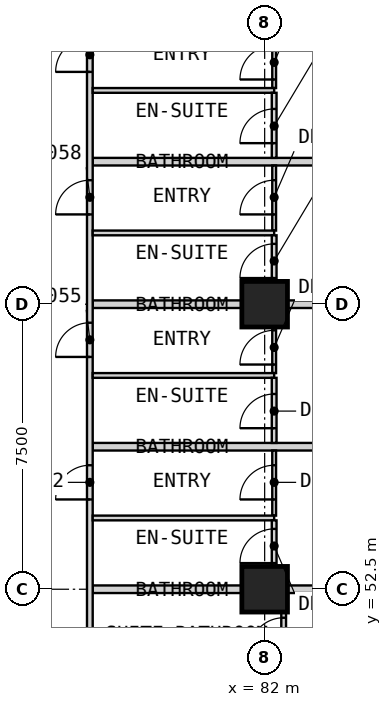
"""IFC4 building model, lengths in metres.
Left out: names, types, materials, properties, quantities, classifications, styles, units other than length and angle.
Written with IfcOpenShell. Run it as: python <this file> out.ifc"""

import sys

from ifc_helpers import new_model, si_unit, direction, frame, frame_2d, origin, origin_2d, place, context, subcontext, project, spatial, rectangle, extrude, element, fill, save


model = new_model("IFC4")
c1 = context("Model", 3, precision=1e-05, world=origin(), true_north=direction((0.0, 1.0)))
c2 = subcontext(c1, "Body", "Model", "MODEL_VIEW")
j1 = project(units=[si_unit("LENGTHUNIT", "METRE"), si_unit("PLANEANGLEUNIT", "RADIAN")], contexts=[c1])
p1 = place(None, origin())
s1 = spatial("IfcSite", under=j1, at=p1, CompositionType="ELEMENT")
p2 = place(p1, origin())
s2 = spatial("IfcBuilding", under=s1, at=p2, CompositionType="ELEMENT")
p3 = place(p2, frame((0.0, 0.0, 34.0)))
s3 = spatial("IfcBuildingStorey", under=s2, at=p3, CompositionType="ELEMENT", Elevation=34.0)
for number, where, z_axis, x_axis in (
    (1, (82.0, 52.5, 0.0), (0.0, 0.0, 1.0), (1.0, 0.0, 0.0)),
    (2, (82.0, 60.0, 0.0), (0.0, 0.0, 1.0), (1.0, 0.0, 0.0)),
):
    element("IfcColumn", number, at=place(p3, frame(where, z_axis=z_axis, x_axis=x_axis)), inside=s3, PredefinedType="COLUMN", context=c2, shape_type="SweptSolid", body=[
        extrude(rectangle(XDim=1.2, YDim=1.2, at=origin_2d()), origin(), (0.0, 0.0, 1.0), 3.6),
    ])
p4 = place(p3, frame((77.475, 52.5, 0.0), z_axis=(0.0, 0.0, 1.0), x_axis=(1.0, 0.0, 0.0)))
e3 = element("IfcWall", 3, at=p4, inside=s3, PredefinedType="PARTITIONING", context=c2, shape_type="SweptSolid", body=[
    extrude(rectangle(XDim=12.525, YDim=0.2, at=frame_2d((6.262, 0.0))), origin(), (0.0, 0.0, 1.0), 3.35),
])
p5 = place(p3, frame((77.475, 56.25, 0.0), z_axis=(0.0, 0.0, 1.0), x_axis=(1.0, 0.0, 0.0)))
e4 = element("IfcWall", 4, at=p5, inside=s3, PredefinedType="PARTITIONING", context=c2, shape_type="SweptSolid", body=[
    extrude(rectangle(XDim=11.715, YDim=0.2, at=frame_2d((5.857, 0.0))), origin(), (0.0, 0.0, 1.0), 3.35),
])
p6 = place(p3, frame((77.475, 60.0, 0.0), z_axis=(0.0, 0.0, 1.0), x_axis=(1.0, 0.0, 0.0)))
e5 = element("IfcWall", 5, at=p6, inside=s3, PredefinedType="PARTITIONING", context=c2, shape_type="SweptSolid", body=[
    extrude(rectangle(XDim=12.525, YDim=0.2, at=frame_2d((6.262, 0.0))), origin(), (0.0, 0.0, 1.0), 3.35),
])
p7 = place(p3, frame((77.475, 63.75, 0.0), z_axis=(0.0, 0.0, 1.0), x_axis=(1.0, 0.0, 0.0)))
e6 = element("IfcWall", 6, at=p7, inside=s3, PredefinedType="PARTITIONING", context=c2, shape_type="SweptSolid", body=[
    extrude(rectangle(XDim=11.715, YDim=0.2, at=frame_2d((5.857, 0.0))), origin(), (0.0, 0.0, 1.0), 3.35),
])
p8 = place(p3, frame((77.4, 50.175, 0.0), z_axis=(0.0, 0.0, 1.0), x_axis=(0.0, 1.0, 0.0)))
e7 = element("IfcWall", 7, at=p8, inside=s3, PredefinedType="PARTITIONING", context=c2, shape_type="SweptSolid", body=[
    extrude(rectangle(XDim=42.15, YDim=0.15, at=frame_2d((21.075, 0.0))), origin(), (0.0, 0.0, 1.0), 3.35),
])
p9 = place(p8, frame((4.688, 0.0, 0.0)))
e8 = element("IfcOpeningElement", 8, at=p9, cuts=e7, PredefinedType="OPENING", context=c2, shape_type="SweptSolid", body=[
    extrude(rectangle(XDim=0.9, YDim=2.1, at=frame_2d((0.45, 1.05))), frame((0.0, 0.085, 0.0), z_axis=(0.0, -1.0, 0.0), x_axis=(1.0, 0.0, 0.0)), (0.0, 0.0, 1.0), 0.17),
])
p10 = place(p8, frame((8.438, 0.0, 0.0)))
e9 = element("IfcOpeningElement", 9, at=p10, cuts=e7, PredefinedType="OPENING", context=c2, shape_type="SweptSolid", body=[
    extrude(rectangle(XDim=0.9, YDim=2.1, at=frame_2d((0.45, 1.05))), frame((0.0, 0.085, 0.0), z_axis=(0.0, -1.0, 0.0), x_axis=(1.0, 0.0, 0.0)), (0.0, 0.0, 1.0), 0.17),
])
p11 = place(p8, frame((12.188, 0.0, 0.0)))
e10 = element("IfcOpeningElement", 10, at=p11, cuts=e7, PredefinedType="OPENING", context=c2, shape_type="SweptSolid", body=[
    extrude(rectangle(XDim=0.9, YDim=2.1, at=frame_2d((0.45, 1.05))), frame((0.0, 0.085, 0.0), z_axis=(0.0, -1.0, 0.0), x_axis=(1.0, 0.0, 0.0)), (0.0, 0.0, 1.0), 0.17),
])
p12 = place(p8, frame((15.938, 0.0, 0.0)))
e11 = element("IfcOpeningElement", 11, at=p12, cuts=e7, PredefinedType="OPENING", context=c2, shape_type="SweptSolid", body=[
    extrude(rectangle(XDim=0.9, YDim=2.1, at=frame_2d((0.45, 1.05))), frame((0.0, 0.085, 0.0), z_axis=(0.0, -1.0, 0.0), x_axis=(1.0, 0.0, 0.0)), (0.0, 0.0, 1.0), 0.17),
])
p13 = place(p8, frame((19.688, 0.0, 0.0)))
e12 = element("IfcOpeningElement", 12, at=p13, cuts=e7, PredefinedType="OPENING", context=c2, shape_type="SweptSolid", body=[
    extrude(rectangle(XDim=0.9, YDim=2.1, at=frame_2d((0.45, 1.05))), frame((0.0, 0.085, 0.0), z_axis=(0.0, -1.0, 0.0), x_axis=(1.0, 0.0, 0.0)), (0.0, 0.0, 1.0), 0.17),
])
p14 = place(p8, frame((23.438, 0.0, 0.0)))
e13 = element("IfcOpeningElement", 13, at=p14, cuts=e7, PredefinedType="OPENING", context=c2, shape_type="SweptSolid", body=[
    extrude(rectangle(XDim=0.9, YDim=2.1, at=frame_2d((0.45, 1.05))), frame((0.0, 0.085, 0.0), z_axis=(0.0, -1.0, 0.0), x_axis=(1.0, 0.0, 0.0)), (0.0, 0.0, 1.0), 0.17),
])
p15 = place(p8, frame((27.188, 0.0, 0.0)))
e14 = element("IfcOpeningElement", 14, at=p15, cuts=e7, PredefinedType="OPENING", context=c2, shape_type="SweptSolid", body=[
    extrude(rectangle(XDim=0.9, YDim=2.1, at=frame_2d((0.45, 1.05))), frame((0.0, 0.085, 0.0), z_axis=(0.0, -1.0, 0.0), x_axis=(1.0, 0.0, 0.0)), (0.0, 0.0, 1.0), 0.17),
])
p16 = place(p8, frame((30.938, 0.0, 0.0)))
e15 = element("IfcOpeningElement", 15, at=p16, cuts=e7, PredefinedType="OPENING", context=c2, shape_type="SweptSolid", body=[
    extrude(rectangle(XDim=0.9, YDim=2.1, at=frame_2d((0.45, 1.05))), frame((0.0, 0.085, 0.0), z_axis=(0.0, -1.0, 0.0), x_axis=(1.0, 0.0, 0.0)), (0.0, 0.0, 1.0), 0.17),
])
p17 = place(p8, frame((34.688, 0.0, 0.0)))
e16 = element("IfcOpeningElement", 16, at=p17, cuts=e7, PredefinedType="OPENING", context=c2, shape_type="SweptSolid", body=[
    extrude(rectangle(XDim=0.9, YDim=2.1, at=frame_2d((0.45, 1.05))), frame((0.0, 0.085, 0.0), z_axis=(0.0, -1.0, 0.0), x_axis=(1.0, 0.0, 0.0)), (0.0, 0.0, 1.0), 0.17),
])
p18 = place(p8, frame((38.438, 0.0, 0.0)))
e17 = element("IfcOpeningElement", 17, at=p18, cuts=e7, PredefinedType="OPENING", context=c2, shape_type="SweptSolid", body=[
    extrude(rectangle(XDim=0.9, YDim=2.1, at=frame_2d((0.45, 1.05))), frame((0.0, 0.085, 0.0), z_axis=(0.0, -1.0, 0.0), x_axis=(1.0, 0.0, 0.0)), (0.0, 0.0, 1.0), 0.17),
])
p19 = place(p3, frame((82.25, 54.438, 0.0), z_axis=(0.0, 0.0, 1.0), x_axis=(0.0, 1.0, 0.0)))
e18 = element("IfcWall", 18, at=p19, inside=s3, PredefinedType="PARTITIONING", context=c2, shape_type="SweptSolid", body=[
    extrude(rectangle(XDim=1.712, YDim=0.1, at=frame_2d((0.856, 0.0))), origin(), (0.0, 0.0, 1.0), 3.35),
])
p20 = place(p19, frame((0.425, 0.0, 0.0)))
e19 = element("IfcOpeningElement", 19, at=p20, cuts=e18, PredefinedType="OPENING", context=c2, shape_type="SweptSolid", body=[
    extrude(rectangle(XDim=0.9, YDim=2.1, at=frame_2d((0.45, 1.05))), frame((0.0, 0.06, 0.0), z_axis=(0.0, -1.0, 0.0), x_axis=(1.0, 0.0, 0.0)), (0.0, 0.0, 1.0), 0.12),
])
p21 = place(p3, frame((82.25, 58.188, 0.0), z_axis=(0.0, 0.0, 1.0), x_axis=(0.0, 1.0, 0.0)))
e20 = element("IfcWall", 20, at=p21, inside=s3, PredefinedType="PARTITIONING", context=c2, shape_type="SweptSolid", body=[
    extrude(rectangle(XDim=1.712, YDim=0.1, at=frame_2d((0.856, 0.0))), origin(), (0.0, 0.0, 1.0), 3.35),
])
p22 = place(p21, frame((0.225, 0.0, 0.0)))
e21 = element("IfcOpeningElement", 21, at=p22, cuts=e20, PredefinedType="OPENING", context=c2, shape_type="SweptSolid", body=[
    extrude(rectangle(XDim=0.9, YDim=2.1, at=frame_2d((0.45, 1.05))), frame((0.0, 0.06, 0.0), z_axis=(0.0, -1.0, 0.0), x_axis=(1.0, 0.0, 0.0)), (0.0, 0.0, 1.0), 0.12),
])
p23 = place(p3, frame((82.25, 61.938, 0.0), z_axis=(0.0, 0.0, 1.0), x_axis=(0.0, 1.0, 0.0)))
e22 = element("IfcWall", 22, at=p23, inside=s3, PredefinedType="PARTITIONING", context=c2, shape_type="SweptSolid", body=[
    extrude(rectangle(XDim=1.712, YDim=0.1, at=frame_2d((0.856, 0.0))), origin(), (0.0, 0.0, 1.0), 3.35),
])
p24 = place(p23, frame((0.425, 0.0, 0.0)))
e23 = element("IfcOpeningElement", 23, at=p24, cuts=e22, PredefinedType="OPENING", context=c2, shape_type="SweptSolid", body=[
    extrude(rectangle(XDim=0.9, YDim=2.1, at=frame_2d((0.45, 1.05))), frame((0.0, 0.06, 0.0), z_axis=(0.0, -1.0, 0.0), x_axis=(1.0, 0.0, 0.0)), (0.0, 0.0, 1.0), 0.12),
])
p25 = place(p3, frame((82.25, 65.688, 0.0), z_axis=(0.0, 0.0, 1.0), x_axis=(0.0, 1.0, 0.0)))
e24 = element("IfcWall", 24, at=p25, inside=s3, PredefinedType="PARTITIONING", context=c2, shape_type="SweptSolid", body=[
    extrude(rectangle(XDim=1.712, YDim=0.1, at=frame_2d((0.856, 0.0))), origin(), (0.0, 0.0, 1.0), 3.35),
])
p26 = place(p25, frame((0.225, 0.0, 0.0)))
e25 = element("IfcOpeningElement", 25, at=p26, cuts=e24, PredefinedType="OPENING", context=c2, shape_type="SweptSolid", body=[
    extrude(rectangle(XDim=0.9, YDim=2.1, at=frame_2d((0.45, 1.05))), frame((0.0, 0.06, 0.0), z_axis=(0.0, -1.0, 0.0), x_axis=(1.0, 0.0, 0.0)), (0.0, 0.0, 1.0), 0.12),
])
for number, where, z_axis, x_axis in (
    (26, (77.475, 54.375, 0.0), (0.0, 0.0, 1.0), (1.0, 0.0, 0.0)),
    (27, (77.475, 58.125, 0.0), (0.0, 0.0, 1.0), (1.0, 0.0, 0.0)),
    (28, (77.475, 61.875, 0.0), (0.0, 0.0, 1.0), (1.0, 0.0, 0.0)),
    (29, (77.475, 65.625, 0.0), (0.0, 0.0, 1.0), (1.0, 0.0, 0.0)),
):
    element("IfcWall", number, at=place(p3, frame(where, z_axis=z_axis, x_axis=x_axis)), inside=s3, PredefinedType="PARTITIONING", context=c2, shape_type="SweptSolid", body=[
        extrude(rectangle(XDim=4.775, YDim=0.125, at=frame_2d((2.387, 0.0))), origin(), (0.0, 0.0, 1.0), 3.35),
    ])
p27 = place(p3, frame((82.25, 52.6, 0.0), z_axis=(0.0, 0.0, 1.0), x_axis=(0.0, 1.0, 0.0)))
e30 = element("IfcWall", 30, at=p27, inside=s3, PredefinedType="PARTITIONING", context=c2, shape_type="SweptSolid", body=[
    extrude(rectangle(XDim=1.712, YDim=0.125, at=frame_2d((0.856, 0.0))), origin(), (0.0, 0.0, 1.0), 3.35),
])
p28 = place(p27, frame((0.587, 0.0, 0.0)))
e31 = element("IfcOpeningElement", 31, at=p28, cuts=e30, PredefinedType="OPENING", context=c2, shape_type="SweptSolid", body=[
    extrude(rectangle(XDim=0.9, YDim=2.1, at=frame_2d((0.45, 1.05))), frame((0.0, 0.073, 0.0), z_axis=(0.0, -1.0, 0.0), x_axis=(1.0, 0.0, 0.0)), (0.0, 0.0, 1.0), 0.145),
])
p29 = place(p3, frame((82.25, 56.35, 0.0), z_axis=(0.0, 0.0, 1.0), x_axis=(0.0, 1.0, 0.0)))
e32 = element("IfcWall", 32, at=p29, inside=s3, PredefinedType="PARTITIONING", context=c2, shape_type="SweptSolid", body=[
    extrude(rectangle(XDim=1.712, YDim=0.125, at=frame_2d((0.856, 0.0))), origin(), (0.0, 0.0, 1.0), 3.35),
])
p30 = place(p29, frame((0.387, 0.0, 0.0)))
e33 = element("IfcOpeningElement", 33, at=p30, cuts=e32, PredefinedType="OPENING", context=c2, shape_type="SweptSolid", body=[
    extrude(rectangle(XDim=0.9, YDim=2.1, at=frame_2d((0.45, 1.05))), frame((0.0, 0.073, 0.0), z_axis=(0.0, -1.0, 0.0), x_axis=(1.0, 0.0, 0.0)), (0.0, 0.0, 1.0), 0.145),
])
p31 = place(p3, frame((82.25, 60.1, 0.0), z_axis=(0.0, 0.0, 1.0), x_axis=(0.0, 1.0, 0.0)))
e34 = element("IfcWall", 34, at=p31, inside=s3, PredefinedType="PARTITIONING", context=c2, shape_type="SweptSolid", body=[
    extrude(rectangle(XDim=1.712, YDim=0.125, at=frame_2d((0.856, 0.0))), origin(), (0.0, 0.0, 1.0), 3.35),
])
p32 = place(p31, frame((0.587, 0.0, 0.0)))
e35 = element("IfcOpeningElement", 35, at=p32, cuts=e34, PredefinedType="OPENING", context=c2, shape_type="SweptSolid", body=[
    extrude(rectangle(XDim=0.9, YDim=2.1, at=frame_2d((0.45, 1.05))), frame((0.0, 0.073, 0.0), z_axis=(0.0, -1.0, 0.0), x_axis=(1.0, 0.0, 0.0)), (0.0, 0.0, 1.0), 0.145),
])
p33 = place(p3, frame((82.25, 63.85, 0.0), z_axis=(0.0, 0.0, 1.0), x_axis=(0.0, 1.0, 0.0)))
e36 = element("IfcWall", 36, at=p33, inside=s3, PredefinedType="PARTITIONING", context=c2, shape_type="SweptSolid", body=[
    extrude(rectangle(XDim=1.712, YDim=0.125, at=frame_2d((0.856, 0.0))), origin(), (0.0, 0.0, 1.0), 3.35),
])
p34 = place(p33, frame((0.387, 0.0, 0.0)))
e37 = element("IfcOpeningElement", 37, at=p34, cuts=e36, PredefinedType="OPENING", context=c2, shape_type="SweptSolid", body=[
    extrude(rectangle(XDim=0.9, YDim=2.1, at=frame_2d((0.45, 1.05))), frame((0.0, 0.073, 0.0), z_axis=(0.0, -1.0, 0.0), x_axis=(1.0, 0.0, 0.0)), (0.0, 0.0, 1.0), 0.145),
])
p35 = place(p3, frame((82.5, 50.163, 0.0), z_axis=(0.0, 0.0, 1.0), x_axis=(0.0, 1.0, 0.0)))
e38 = element("IfcWall", 38, at=p35, inside=s3, PredefinedType="PARTITIONING", context=c2, shape_type="SweptSolid", body=[
    extrude(rectangle(XDim=2.237, YDim=0.125, at=frame_2d((1.119, 0.0))), origin(), (0.0, 0.0, 1.0), 3.35),
])
p36 = place(p35, frame((0.688, 0.0, 0.0)))
e39 = element("IfcOpeningElement", 39, at=p36, cuts=e38, PredefinedType="OPENING", context=c2, shape_type="SweptSolid", body=[
    extrude(rectangle(XDim=0.9, YDim=2.1, at=frame_2d((0.45, 1.05))), frame((0.0, 0.073, 0.0), z_axis=(0.0, -1.0, 0.0), x_axis=(1.0, 0.0, 0.0)), (0.0, 0.0, 1.0), 0.145),
])
p37 = place(p28, origin())
e40 = element("IfcDoor", 40, at=p37, inside=s3, OperationType="SINGLE_SWING_RIGHT", PredefinedType="DOOR", context=c2, shape_type="SweptSolid", body=[
    extrude(rectangle(XDim=0.9, YDim=2.1, at=frame_2d((0.45, 1.05))), frame((0.0, 0.025, 0.0), z_axis=(0.0, -1.0, 0.0), x_axis=(1.0, 0.0, 0.0)), (0.0, 0.0, 1.0), 0.05),
])
fill(e31, e40)
p38 = place(p9, origin())
e41 = element("IfcDoor", 41, at=p38, inside=s3, OperationType="SINGLE_SWING_RIGHT", PredefinedType="DOOR", context=c2, shape_type="SweptSolid", body=[
    extrude(rectangle(XDim=0.9, YDim=2.1, at=frame_2d((0.45, 1.05))), frame((0.0, 0.025, 0.0), z_axis=(0.0, -1.0, 0.0), x_axis=(1.0, 0.0, 0.0)), (0.0, 0.0, 1.0), 0.05),
])
fill(e8, e41)
p39 = place(p20, origin())
e42 = element("IfcDoor", 42, at=p39, inside=s3, OperationType="SINGLE_SWING_LEFT", PredefinedType="DOOR", context=c2, shape_type="SweptSolid", body=[
    extrude(rectangle(XDim=0.9, YDim=2.1, at=frame_2d((0.45, 1.05))), frame((0.0, 0.025, 0.0), z_axis=(0.0, -1.0, 0.0), x_axis=(1.0, 0.0, 0.0)), (0.0, 0.0, 1.0), 0.05),
])
fill(e19, e42)
p40 = place(p30, origin())
e43 = element("IfcDoor", 43, at=p40, inside=s3, OperationType="SINGLE_SWING_LEFT", PredefinedType="DOOR", context=c2, shape_type="SweptSolid", body=[
    extrude(rectangle(XDim=0.9, YDim=2.1, at=frame_2d((0.45, 1.05))), frame((0.0, 0.025, 0.0), z_axis=(0.0, -1.0, 0.0), x_axis=(1.0, 0.0, 0.0)), (0.0, 0.0, 1.0), 0.05),
])
fill(e33, e43)
p41 = place(p10, origin())
e44 = element("IfcDoor", 44, at=p41, inside=s3, OperationType="SINGLE_SWING_RIGHT", PredefinedType="DOOR", context=c2, shape_type="SweptSolid", body=[
    extrude(rectangle(XDim=0.9, YDim=2.1, at=frame_2d((0.45, 1.05))), frame((0.0, 0.025, 0.0), z_axis=(0.0, -1.0, 0.0), x_axis=(1.0, 0.0, 0.0)), (0.0, 0.0, 1.0), 0.05),
])
fill(e9, e44)
p42 = place(p22, origin())
e45 = element("IfcDoor", 45, at=p42, inside=s3, OperationType="SINGLE_SWING_LEFT", PredefinedType="DOOR", context=c2, shape_type="SweptSolid", body=[
    extrude(rectangle(XDim=0.9, YDim=2.1, at=frame_2d((0.45, 1.05))), frame((0.0, 0.025, 0.0), z_axis=(0.0, -1.0, 0.0), x_axis=(1.0, 0.0, 0.0)), (0.0, 0.0, 1.0), 0.05),
])
fill(e21, e45)
p43 = place(p32, origin())
e46 = element("IfcDoor", 46, at=p43, inside=s3, OperationType="SINGLE_SWING_RIGHT", PredefinedType="DOOR", context=c2, shape_type="SweptSolid", body=[
    extrude(rectangle(XDim=0.9, YDim=2.1, at=frame_2d((0.45, 1.05))), frame((0.0, 0.025, 0.0), z_axis=(0.0, -1.0, 0.0), x_axis=(1.0, 0.0, 0.0)), (0.0, 0.0, 1.0), 0.05),
])
fill(e35, e46)
p44 = place(p11, origin())
e47 = element("IfcDoor", 47, at=p44, inside=s3, OperationType="SINGLE_SWING_RIGHT", PredefinedType="DOOR", context=c2, shape_type="SweptSolid", body=[
    extrude(rectangle(XDim=0.9, YDim=2.1, at=frame_2d((0.45, 1.05))), frame((0.0, 0.025, 0.0), z_axis=(0.0, -1.0, 0.0), x_axis=(1.0, 0.0, 0.0)), (0.0, 0.0, 1.0), 0.05),
])
fill(e10, e47)
p45 = place(p24, origin())
e48 = element("IfcDoor", 48, at=p45, inside=s3, OperationType="SINGLE_SWING_LEFT", PredefinedType="DOOR", context=c2, shape_type="SweptSolid", body=[
    extrude(rectangle(XDim=0.9, YDim=2.1, at=frame_2d((0.45, 1.05))), frame((0.0, 0.025, 0.0), z_axis=(0.0, -1.0, 0.0), x_axis=(1.0, 0.0, 0.0)), (0.0, 0.0, 1.0), 0.05),
])
fill(e23, e48)
p46 = place(p34, origin())
e49 = element("IfcDoor", 49, at=p46, inside=s3, OperationType="SINGLE_SWING_LEFT", PredefinedType="DOOR", context=c2, shape_type="SweptSolid", body=[
    extrude(rectangle(XDim=0.9, YDim=2.1, at=frame_2d((0.45, 1.05))), frame((0.0, 0.025, 0.0), z_axis=(0.0, -1.0, 0.0), x_axis=(1.0, 0.0, 0.0)), (0.0, 0.0, 1.0), 0.05),
])
fill(e37, e49)
p47 = place(p12, origin())
e50 = element("IfcDoor", 50, at=p47, inside=s3, OperationType="SINGLE_SWING_RIGHT", PredefinedType="DOOR", context=c2, shape_type="SweptSolid", body=[
    extrude(rectangle(XDim=0.9, YDim=2.1, at=frame_2d((0.45, 1.05))), frame((0.0, 0.025, 0.0), z_axis=(0.0, -1.0, 0.0), x_axis=(1.0, 0.0, 0.0)), (0.0, 0.0, 1.0), 0.05),
])
fill(e11, e50)
p48 = place(p26, origin())
e51 = element("IfcDoor", 51, at=p48, inside=s3, OperationType="SINGLE_SWING_LEFT", PredefinedType="DOOR", context=c2, shape_type="SweptSolid", body=[
    extrude(rectangle(XDim=0.9, YDim=2.1, at=frame_2d((0.45, 1.05))), frame((0.0, 0.025, 0.0), z_axis=(0.0, -1.0, 0.0), x_axis=(1.0, 0.0, 0.0)), (0.0, 0.0, 1.0), 0.05),
])
fill(e25, e51)
p49 = place(p36, origin())
e52 = element("IfcDoor", 52, at=p49, inside=s3, OperationType="SINGLE_SWING_LEFT", PredefinedType="DOOR", context=c2, shape_type="SweptSolid", body=[
    extrude(rectangle(XDim=0.9, YDim=2.1, at=frame_2d((0.45, 1.05))), frame((0.0, 0.025, 0.0), z_axis=(0.0, -1.0, 0.0), x_axis=(1.0, 0.0, 0.0)), (0.0, 0.0, 1.0), 0.05),
])
fill(e39, e52)
save(model, sys.argv[1])
